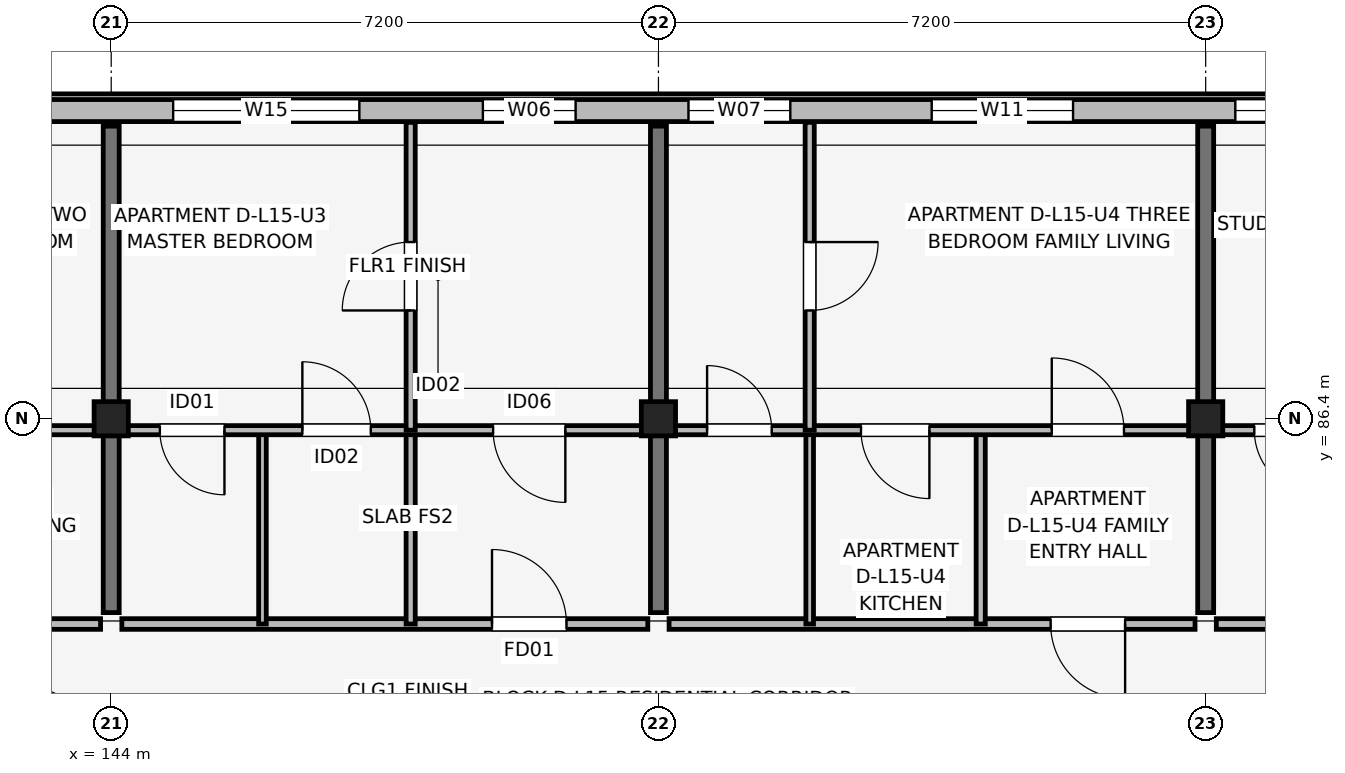
"""IFC4 building model, lengths in metres.
Left out: names, types, materials, properties, quantities, classifications, styles, units other than length and angle.
Written with IfcOpenShell. Run it as: python <this file> out.ifc"""

import sys

from ifc_helpers import new_model, si_unit, direction, frame, frame_2d, origin, origin_2d, place, context, subcontext, project, spatial, rectangle, extrude, element, fill, save


model = new_model("IFC4")
c1 = context("Model", 3, precision=1e-05, world=origin(), true_north=direction((0.0, 1.0)))
c2 = subcontext(c1, "Body", "Model", "MODEL_VIEW")
j1 = project(units=[si_unit("LENGTHUNIT", "METRE"), si_unit("PLANEANGLEUNIT", "RADIAN")], contexts=[c1])
p1 = place(None, origin())
s1 = spatial("IfcSite", under=j1, at=p1, CompositionType="ELEMENT")
p2 = place(p1, origin())
s2 = spatial("IfcBuilding", under=s1, at=p2, CompositionType="ELEMENT")
p3 = place(p2, frame((0.0, 0.0, 49.65)))
s3 = spatial("IfcBuildingStorey", under=s2, at=p3, CompositionType="ELEMENT", Elevation=49.65)
for number, where, z_axis, x_axis in (
    (1, (144.0, 86.4, 0.0), (0.0, 0.0, 1.0), (1.0, 0.0, 0.0)),
    (2, (151.2, 86.4, 0.0), (0.0, 0.0, 1.0), (1.0, 0.0, 0.0)),
    (3, (158.4, 86.4, 0.0), (0.0, 0.0, 1.0), (1.0, 0.0, 0.0)),
):
    element("IfcColumn", number, at=place(p3, frame(where, z_axis=z_axis, x_axis=x_axis)), inside=s3, PredefinedType="COLUMN", context=c2, shape_type="SweptSolid", body=[
        extrude(rectangle(XDim=0.45, YDim=0.45, at=origin_2d()), origin(), (0.0, 0.0, 1.0), 3.15),
    ])
for number, where, z_axis, x_axis in (
    (4, (144.0, 83.85, 0.0), (0.0, 0.0, 1.0), (0.0, 1.0, 0.0)),
    (5, (151.2, 83.85, 0.0), (0.0, 0.0, 1.0), (0.0, 1.0, 0.0)),
    (6, (158.4, 83.85, 0.0), (0.0, 0.0, 1.0), (0.0, 1.0, 0.0)),
):
    element("IfcWall", number, at=place(p3, frame(where, z_axis=z_axis, x_axis=x_axis)), inside=s3, PredefinedType="SHEAR", context=c2, shape_type="SweptSolid", body=[
        extrude(rectangle(XDim=6.4, YDim=0.21, at=frame_2d((3.2, 0.0))), origin(), (0.0, 0.0, 1.0), 3.15),
    ])
p4 = place(p3, frame((161.2, 90.455, 0.0), z_axis=(0.0, 0.0, 1.0), x_axis=(-1.0, 0.0, 0.0)))
e7 = element("IfcWall", 7, at=p4, inside=s3, PredefinedType="SOLIDWALL", context=c2, shape_type="SweptSolid", body=[
    extrude(rectangle(XDim=26.6, YDim=0.29, at=frame_2d((13.3, 0.0))), origin(), (0.0, 0.0, 1.0), 2.48),
])
p5 = place(p4, frame((22.91, 0.0, 0.75)))
e8 = element("IfcOpeningElement", 8, at=p5, cuts=e7, PredefinedType="OPENING", context=c2, shape_type="SweptSolid", body=[
    extrude(rectangle(XDim=0.85, YDim=1.4, at=frame_2d((0.425, 0.7))), frame((0.0, 0.155, 0.0), z_axis=(0.0, -1.0, 0.0), x_axis=(1.0, 0.0, 0.0)), (0.0, 0.0, 1.0), 0.31),
])
p6 = place(p4, frame((18.725, 0.0, 0.7)))
e9 = element("IfcOpeningElement", 9, at=p6, cuts=e7, PredefinedType="OPENING", context=c2, shape_type="SweptSolid", body=[
    extrude(rectangle(XDim=2.3, YDim=1.65, at=frame_2d((1.15, 0.825))), frame((0.0, 0.155, 0.0), z_axis=(0.0, -1.0, 0.0), x_axis=(1.0, 0.0, 0.0)), (0.0, 0.0, 1.0), 0.31),
])
p7 = place(p4, frame((13.935, 0.0, 0.7)))
e10 = element("IfcOpeningElement", 10, at=p7, cuts=e7, PredefinedType="OPENING", context=c2, shape_type="SweptSolid", body=[
    extrude(rectangle(XDim=2.45, YDim=1.65, at=frame_2d((1.225, 0.825))), frame((0.0, 0.155, 0.0), z_axis=(0.0, -1.0, 0.0), x_axis=(1.0, 0.0, 0.0)), (0.0, 0.0, 1.0), 0.31),
])
p8 = place(p4, frame((11.09, 0.0, 0.75)))
e11 = element("IfcOpeningElement", 11, at=p8, cuts=e7, PredefinedType="OPENING", context=c2, shape_type="SweptSolid", body=[
    extrude(rectangle(XDim=1.22, YDim=1.5, at=frame_2d((0.61, 0.75))), frame((0.0, 0.155, 0.0), z_axis=(0.0, -1.0, 0.0), x_axis=(1.0, 0.0, 0.0)), (0.0, 0.0, 1.0), 0.31),
])
p9 = place(p4, frame((8.265, 0.0, 0.75)))
e12 = element("IfcOpeningElement", 12, at=p9, cuts=e7, PredefinedType="OPENING", context=c2, shape_type="SweptSolid", body=[
    extrude(rectangle(XDim=1.34, YDim=1.55, at=frame_2d((0.67, 0.775))), frame((0.0, 0.155, 0.0), z_axis=(0.0, -1.0, 0.0), x_axis=(1.0, 0.0, 0.0)), (0.0, 0.0, 1.0), 0.31),
])
p10 = place(p4, frame((4.545, 0.0, 0.7)))
e13 = element("IfcOpeningElement", 13, at=p10, cuts=e7, PredefinedType="OPENING", context=c2, shape_type="SweptSolid", body=[
    extrude(rectangle(XDim=1.86, YDim=1.6, at=frame_2d((0.93, 0.8))), frame((0.0, 0.155, 0.0), z_axis=(0.0, -1.0, 0.0), x_axis=(1.0, 0.0, 0.0)), (0.0, 0.0, 1.0), 0.31),
])
p11 = place(p4, frame((0.41, 0.0, 0.7)))
e14 = element("IfcOpeningElement", 14, at=p11, cuts=e7, PredefinedType="OPENING", context=c2, shape_type="SweptSolid", body=[
    extrude(rectangle(XDim=2.0, YDim=1.65, at=frame_2d((1.0, 0.825))), frame((0.0, 0.155, 0.0), z_axis=(0.0, -1.0, 0.0), x_axis=(1.0, 0.0, 0.0)), (0.0, 0.0, 1.0), 0.31),
])
p12 = place(p3, frame((136.94, 83.7, 0.0), z_axis=(0.0, 0.0, 1.0), x_axis=(1.0, 0.0, 0.0)))
e15 = element("IfcWall", 15, at=p12, inside=s3, PredefinedType="PARTITIONING", context=c2, shape_type="SweptSolid", body=[
    extrude(rectangle(XDim=6.92, YDim=0.14, at=frame_2d((3.46, 0.0))), origin(), (0.0, 0.0, 1.0), 2.38),
])
p13 = place(p12, frame((6.0, 0.0, 0.0), z_axis=(0.0, 0.0, 1.0), x_axis=(-1.0, 0.0, 0.0)))
e16 = element("IfcOpeningElement", 16, at=p13, cuts=e15, PredefinedType="OPENING", context=c2, shape_type="SweptSolid", body=[
    extrude(rectangle(XDim=0.98, YDim=2.1, at=frame_2d((0.49, 1.05))), frame((0.0, 0.08, 0.0), z_axis=(0.0, -1.0, 0.0), x_axis=(1.0, 0.0, 0.0)), (0.0, 0.0, 1.0), 0.16),
])
p14 = place(p3, frame((136.94, 86.25, 0.0), z_axis=(0.0, 0.0, 1.0), x_axis=(1.0, 0.0, 0.0)))
e17 = element("IfcWall", 17, at=p14, inside=s3, PredefinedType="PARTITIONING", context=c2, shape_type="SweptSolid", body=[
    extrude(rectangle(XDim=6.92, YDim=0.12, at=frame_2d((3.46, 0.0))), origin(), (0.0, 0.0, 1.0), 2.38),
])
p15 = place(p14, frame((0.5, 0.0, 0.0)))
e18 = element("IfcOpeningElement", 18, at=p15, cuts=e17, PredefinedType="OPENING", context=c2, shape_type="SweptSolid", body=[
    extrude(rectangle(XDim=0.85, YDim=2.08, at=frame_2d((0.425, 1.04))), frame((0.0, 0.07, 0.0), z_axis=(0.0, -1.0, 0.0), x_axis=(1.0, 0.0, 0.0)), (0.0, 0.0, 1.0), 0.14),
])
p16 = place(p14, frame((3.425, 0.0, 0.0), z_axis=(0.0, 0.0, 1.0), x_axis=(-1.0, 0.0, 0.0)))
e19 = element("IfcOpeningElement", 19, at=p16, cuts=e17, PredefinedType="OPENING", context=c2, shape_type="SweptSolid", body=[
    extrude(rectangle(XDim=0.9, YDim=2.08, at=frame_2d((0.45, 1.04))), frame((0.0, 0.07, 0.0), z_axis=(0.0, -1.0, 0.0), x_axis=(1.0, 0.0, 0.0)), (0.0, 0.0, 1.0), 0.14),
])
p17 = place(p14, frame((5.035, 0.0, 0.0)))
e20 = element("IfcOpeningElement", 20, at=p17, cuts=e17, PredefinedType="OPENING", context=c2, shape_type="SweptSolid", body=[
    extrude(rectangle(XDim=0.95, YDim=2.08, at=frame_2d((0.475, 1.04))), frame((0.0, 0.07, 0.0), z_axis=(0.0, -1.0, 0.0), x_axis=(1.0, 0.0, 0.0)), (0.0, 0.0, 1.0), 0.14),
])
p18 = place(p3, frame((144.14, 83.7, 0.0), z_axis=(0.0, 0.0, 1.0), x_axis=(1.0, 0.0, 0.0)))
e21 = element("IfcWall", 21, at=p18, inside=s3, PredefinedType="PARTITIONING", context=c2, shape_type="SweptSolid", body=[
    extrude(rectangle(XDim=6.92, YDim=0.14, at=frame_2d((3.46, 0.0))), origin(), (0.0, 0.0, 1.0), 2.38),
])
p19 = place(p18, frame((4.87, 0.0, 0.0)))
e22 = element("IfcOpeningElement", 22, at=p19, cuts=e21, PredefinedType="OPENING", context=c2, shape_type="SweptSolid", body=[
    extrude(rectangle(XDim=0.98, YDim=2.1, at=frame_2d((0.49, 1.05))), frame((0.0, 0.08, 0.0), z_axis=(0.0, -1.0, 0.0), x_axis=(1.0, 0.0, 0.0)), (0.0, 0.0, 1.0), 0.16),
])
p20 = place(p3, frame((145.99, 83.7, 0.0), z_axis=(0.0, 0.0, 1.0), x_axis=(0.0, 1.0, 0.0)))
e23 = element("IfcWall", 23, at=p20, inside=s3, PredefinedType="PARTITIONING", context=c2, shape_type="SweptSolid", body=[
    extrude(rectangle(XDim=2.55, YDim=0.1, at=frame_2d((1.275, 0.0))), origin(), (0.0, 0.0, 1.0), 2.38),
])
p21 = place(p3, frame((147.94, 83.7, 0.0), z_axis=(0.0, 0.0, 1.0), x_axis=(0.0, 1.0, 0.0)))
e24 = element("IfcWall", 24, at=p21, inside=s3, PredefinedType="PARTITIONING", context=c2, shape_type="SweptSolid", body=[
    extrude(rectangle(XDim=2.55, YDim=0.12, at=frame_2d((1.275, 0.0))), origin(), (0.0, 0.0, 1.0), 2.38),
])
p22 = place(p3, frame((144.14, 86.25, 0.0), z_axis=(0.0, 0.0, 1.0), x_axis=(1.0, 0.0, 0.0)))
e25 = element("IfcWall", 25, at=p22, inside=s3, PredefinedType="PARTITIONING", context=c2, shape_type="SweptSolid", body=[
    extrude(rectangle(XDim=6.92, YDim=0.12, at=frame_2d((3.46, 0.0))), origin(), (0.0, 0.0, 1.0), 2.38),
])
p23 = place(p22, frame((1.35, 0.0, 0.0), z_axis=(0.0, 0.0, 1.0), x_axis=(-1.0, 0.0, 0.0)))
e26 = element("IfcOpeningElement", 26, at=p23, cuts=e25, PredefinedType="OPENING", context=c2, shape_type="SweptSolid", body=[
    extrude(rectangle(XDim=0.85, YDim=2.08, at=frame_2d((0.425, 1.04))), frame((0.0, 0.07, 0.0), z_axis=(0.0, -1.0, 0.0), x_axis=(1.0, 0.0, 0.0)), (0.0, 0.0, 1.0), 0.14),
])
p24 = place(p22, frame((2.375, 0.0, 0.0)))
e27 = element("IfcOpeningElement", 27, at=p24, cuts=e25, PredefinedType="OPENING", context=c2, shape_type="SweptSolid", body=[
    extrude(rectangle(XDim=0.9, YDim=2.08, at=frame_2d((0.45, 1.04))), frame((0.0, 0.07, 0.0), z_axis=(0.0, -1.0, 0.0), x_axis=(1.0, 0.0, 0.0)), (0.0, 0.0, 1.0), 0.14),
])
p25 = place(p22, frame((5.835, 0.0, 0.0), z_axis=(0.0, 0.0, 1.0), x_axis=(-1.0, 0.0, 0.0)))
e28 = element("IfcOpeningElement", 28, at=p25, cuts=e25, PredefinedType="OPENING", context=c2, shape_type="SweptSolid", body=[
    extrude(rectangle(XDim=0.95, YDim=2.08, at=frame_2d((0.475, 1.04))), frame((0.0, 0.07, 0.0), z_axis=(0.0, -1.0, 0.0), x_axis=(1.0, 0.0, 0.0)), (0.0, 0.0, 1.0), 0.14),
])
p26 = place(p3, frame((147.94, 86.25, 0.0), z_axis=(0.0, 0.0, 1.0), x_axis=(0.0, 1.0, 0.0)))
e29 = element("IfcWall", 29, at=p26, inside=s3, PredefinedType="PARTITIONING", context=c2, shape_type="SweptSolid", body=[
    extrude(rectangle(XDim=4.05, YDim=0.12, at=frame_2d((2.025, 0.0))), origin(), (0.0, 0.0, 1.0), 2.38),
])
p27 = place(p26, frame((1.575, 0.0, 0.0)))
e30 = element("IfcOpeningElement", 30, at=p27, cuts=e29, PredefinedType="OPENING", context=c2, shape_type="SweptSolid", body=[
    extrude(rectangle(XDim=0.9, YDim=2.08, at=frame_2d((0.45, 1.04))), frame((0.0, 0.07, 0.0), z_axis=(0.0, -1.0, 0.0), x_axis=(1.0, 0.0, 0.0)), (0.0, 0.0, 1.0), 0.14),
])
p28 = place(p3, frame((151.34, 83.7, 0.0), z_axis=(0.0, 0.0, 1.0), x_axis=(1.0, 0.0, 0.0)))
e31 = element("IfcWall", 31, at=p28, inside=s3, PredefinedType="PARTITIONING", context=c2, shape_type="SweptSolid", body=[
    extrude(rectangle(XDim=6.92, YDim=0.14, at=frame_2d((3.46, 0.0))), origin(), (0.0, 0.0, 1.0), 2.38),
])
p29 = place(p28, frame((6.0, 0.0, 0.0), z_axis=(0.0, 0.0, 1.0), x_axis=(-1.0, 0.0, 0.0)))
e32 = element("IfcOpeningElement", 32, at=p29, cuts=e31, PredefinedType="OPENING", context=c2, shape_type="SweptSolid", body=[
    extrude(rectangle(XDim=0.98, YDim=2.1, at=frame_2d((0.49, 1.05))), frame((0.0, 0.08, 0.0), z_axis=(0.0, -1.0, 0.0), x_axis=(1.0, 0.0, 0.0)), (0.0, 0.0, 1.0), 0.16),
])
p30 = place(p3, frame((153.19, 83.7, 0.0), z_axis=(0.0, 0.0, 1.0), x_axis=(0.0, 1.0, 0.0)))
e33 = element("IfcWall", 33, at=p30, inside=s3, PredefinedType="PARTITIONING", context=c2, shape_type="SweptSolid", body=[
    extrude(rectangle(XDim=2.55, YDim=0.1, at=frame_2d((1.275, 0.0))), origin(), (0.0, 0.0, 1.0), 2.38),
])
p31 = place(p3, frame((155.44, 83.7, 0.0), z_axis=(0.0, 0.0, 1.0), x_axis=(0.0, 1.0, 0.0)))
e34 = element("IfcWall", 34, at=p31, inside=s3, PredefinedType="PARTITIONING", context=c2, shape_type="SweptSolid", body=[
    extrude(rectangle(XDim=2.55, YDim=0.12, at=frame_2d((1.275, 0.0))), origin(), (0.0, 0.0, 1.0), 2.38),
])
p32 = place(p3, frame((151.34, 86.25, 0.0), z_axis=(0.0, 0.0, 1.0), x_axis=(1.0, 0.0, 0.0)))
e35 = element("IfcWall", 35, at=p32, inside=s3, PredefinedType="PARTITIONING", context=c2, shape_type="SweptSolid", body=[
    extrude(rectangle(XDim=6.92, YDim=0.12, at=frame_2d((3.46, 0.0))), origin(), (0.0, 0.0, 1.0), 2.38),
])
p33 = place(p32, frame((0.5, 0.0, 0.0)))
e36 = element("IfcOpeningElement", 36, at=p33, cuts=e35, PredefinedType="OPENING", context=c2, shape_type="SweptSolid", body=[
    extrude(rectangle(XDim=0.85, YDim=2.08, at=frame_2d((0.425, 1.04))), frame((0.0, 0.07, 0.0), z_axis=(0.0, -1.0, 0.0), x_axis=(1.0, 0.0, 0.0)), (0.0, 0.0, 1.0), 0.14),
])
p34 = place(p32, frame((3.425, 0.0, 0.0), z_axis=(0.0, 0.0, 1.0), x_axis=(-1.0, 0.0, 0.0)))
e37 = element("IfcOpeningElement", 37, at=p34, cuts=e35, PredefinedType="OPENING", context=c2, shape_type="SweptSolid", body=[
    extrude(rectangle(XDim=0.9, YDim=2.08, at=frame_2d((0.45, 1.04))), frame((0.0, 0.07, 0.0), z_axis=(0.0, -1.0, 0.0), x_axis=(1.0, 0.0, 0.0)), (0.0, 0.0, 1.0), 0.14),
])
p35 = place(p32, frame((5.035, 0.0, 0.0)))
e38 = element("IfcOpeningElement", 38, at=p35, cuts=e35, PredefinedType="OPENING", context=c2, shape_type="SweptSolid", body=[
    extrude(rectangle(XDim=0.95, YDim=2.08, at=frame_2d((0.475, 1.04))), frame((0.0, 0.07, 0.0), z_axis=(0.0, -1.0, 0.0), x_axis=(1.0, 0.0, 0.0)), (0.0, 0.0, 1.0), 0.14),
])
p36 = place(p3, frame((153.19, 86.25, 0.0), z_axis=(0.0, 0.0, 1.0), x_axis=(0.0, 1.0, 0.0)))
e39 = element("IfcWall", 39, at=p36, inside=s3, PredefinedType="PARTITIONING", context=c2, shape_type="SweptSolid", body=[
    extrude(rectangle(XDim=4.05, YDim=0.12, at=frame_2d((2.025, 0.0))), origin(), (0.0, 0.0, 1.0), 2.38),
])
p37 = place(p36, frame((2.475, 0.0, 0.0), z_axis=(0.0, 0.0, 1.0), x_axis=(-1.0, 0.0, 0.0)))
e40 = element("IfcOpeningElement", 40, at=p37, cuts=e39, PredefinedType="OPENING", context=c2, shape_type="SweptSolid", body=[
    extrude(rectangle(XDim=0.9, YDim=2.08, at=frame_2d((0.45, 1.04))), frame((0.0, 0.07, 0.0), z_axis=(0.0, -1.0, 0.0), x_axis=(1.0, 0.0, 0.0)), (0.0, 0.0, 1.0), 0.14),
])
p38 = place(p3, frame((158.54, 83.7, 0.0), z_axis=(0.0, 0.0, 1.0), x_axis=(1.0, 0.0, 0.0)))
e41 = element("IfcWall", 41, at=p38, inside=s3, PredefinedType="PARTITIONING", context=c2, shape_type="SweptSolid", body=[
    extrude(rectangle(XDim=4.52, YDim=0.14, at=frame_2d((2.26, 0.0))), origin(), (0.0, 0.0, 1.0), 2.38),
])
p39 = place(p38, frame((2.54, 0.0, 0.0)))
e42 = element("IfcOpeningElement", 42, at=p39, cuts=e41, PredefinedType="OPENING", context=c2, shape_type="SweptSolid", body=[
    extrude(rectangle(XDim=0.98, YDim=2.1, at=frame_2d((0.49, 1.05))), frame((0.0, 0.08, 0.0), z_axis=(0.0, -1.0, 0.0), x_axis=(1.0, 0.0, 0.0)), (0.0, 0.0, 1.0), 0.16),
])
p40 = place(p3, frame((158.54, 86.25, 0.0), z_axis=(0.0, 0.0, 1.0), x_axis=(1.0, 0.0, 0.0)))
e43 = element("IfcWall", 43, at=p40, inside=s3, PredefinedType="PARTITIONING", context=c2, shape_type="SweptSolid", body=[
    extrude(rectangle(XDim=4.52, YDim=0.12, at=frame_2d((2.26, 0.0))), origin(), (0.0, 0.0, 1.0), 2.38),
])
p41 = place(p40, frame((1.35, 0.0, 0.0), z_axis=(0.0, 0.0, 1.0), x_axis=(-1.0, 0.0, 0.0)))
e44 = element("IfcOpeningElement", 44, at=p41, cuts=e43, PredefinedType="OPENING", context=c2, shape_type="SweptSolid", body=[
    extrude(rectangle(XDim=0.85, YDim=2.08, at=frame_2d((0.425, 1.04))), frame((0.0, 0.07, 0.0), z_axis=(0.0, -1.0, 0.0), x_axis=(1.0, 0.0, 0.0)), (0.0, 0.0, 1.0), 0.14),
])
p42 = place(p40, frame((2.58, 0.0, 0.0)))
e45 = element("IfcOpeningElement", 45, at=p42, cuts=e43, PredefinedType="OPENING", context=c2, shape_type="SweptSolid", body=[
    extrude(rectangle(XDim=0.9, YDim=2.08, at=frame_2d((0.45, 1.04))), frame((0.0, 0.07, 0.0), z_axis=(0.0, -1.0, 0.0), x_axis=(1.0, 0.0, 0.0)), (0.0, 0.0, 1.0), 0.14),
])
p43 = place(p7, origin())
e46 = element("IfcWindow", 46, at=p43, inside=s3, PartitioningType="SINGLE_PANEL", PredefinedType="WINDOW", context=c2, shape_type="SweptSolid", body=[
    extrude(rectangle(XDim=2.45, YDim=1.65, at=frame_2d((1.225, 0.825))), frame((0.0, 0.03, 0.0), z_axis=(0.0, -1.0, 0.0), x_axis=(1.0, 0.0, 0.0)), (0.0, 0.0, 1.0), 0.06),
])
fill(e10, e46)
p44 = place(p8, origin())
e47 = element("IfcWindow", 47, at=p44, inside=s3, PartitioningType="SINGLE_PANEL", PredefinedType="WINDOW", context=c2, shape_type="SweptSolid", body=[
    extrude(rectangle(XDim=1.22, YDim=1.5, at=frame_2d((0.61, 0.75))), frame((0.0, 0.03, 0.0), z_axis=(0.0, -1.0, 0.0), x_axis=(1.0, 0.0, 0.0)), (0.0, 0.0, 1.0), 0.06),
])
fill(e11, e47)
p45 = place(p9, origin())
e48 = element("IfcWindow", 48, at=p45, inside=s3, PartitioningType="SINGLE_PANEL", PredefinedType="WINDOW", context=c2, shape_type="SweptSolid", body=[
    extrude(rectangle(XDim=1.34, YDim=1.55, at=frame_2d((0.67, 0.775))), frame((0.0, 0.03, 0.0), z_axis=(0.0, -1.0, 0.0), x_axis=(1.0, 0.0, 0.0)), (0.0, 0.0, 1.0), 0.06),
])
fill(e12, e48)
p46 = place(p10, origin())
e49 = element("IfcWindow", 49, at=p46, inside=s3, PartitioningType="SINGLE_PANEL", PredefinedType="WINDOW", context=c2, shape_type="SweptSolid", body=[
    extrude(rectangle(XDim=1.86, YDim=1.6, at=frame_2d((0.93, 0.8))), frame((0.0, 0.03, 0.0), z_axis=(0.0, -1.0, 0.0), x_axis=(1.0, 0.0, 0.0)), (0.0, 0.0, 1.0), 0.06),
])
fill(e13, e49)
p47 = place(p11, origin())
e50 = element("IfcWindow", 50, at=p47, inside=s3, PartitioningType="SINGLE_PANEL", PredefinedType="WINDOW", context=c2, shape_type="SweptSolid", body=[
    extrude(rectangle(XDim=2.0, YDim=1.65, at=frame_2d((1.0, 0.825))), frame((0.0, 0.03, 0.0), z_axis=(0.0, -1.0, 0.0), x_axis=(1.0, 0.0, 0.0)), (0.0, 0.0, 1.0), 0.06),
])
fill(e14, e50)
p48 = place(p19, origin())
e51 = element("IfcDoor", 51, at=p48, inside=s3, OperationType="SINGLE_SWING_LEFT", PredefinedType="DOOR", context=c2, shape_type="SweptSolid", body=[
    extrude(rectangle(XDim=0.98, YDim=2.1, at=frame_2d((0.49, 1.05))), frame((0.0, 0.025, 0.0), z_axis=(0.0, -1.0, 0.0), x_axis=(1.0, 0.0, 0.0)), (0.0, 0.0, 1.0), 0.05),
])
fill(e22, e51)
p49 = place(p23, origin())
e52 = element("IfcDoor", 52, at=p49, inside=s3, OperationType="SINGLE_SWING_RIGHT", PredefinedType="DOOR", context=c2, shape_type="SweptSolid", body=[
    extrude(rectangle(XDim=0.85, YDim=2.08, at=frame_2d((0.425, 1.04))), frame((0.0, 0.025, 0.0), z_axis=(0.0, -1.0, 0.0), x_axis=(1.0, 0.0, 0.0)), (0.0, 0.0, 1.0), 0.05),
])
fill(e26, e52)
p50 = place(p24, origin())
e53 = element("IfcDoor", 53, at=p50, inside=s3, OperationType="SINGLE_SWING_LEFT", PredefinedType="DOOR", context=c2, shape_type="SweptSolid", body=[
    extrude(rectangle(XDim=0.9, YDim=2.08, at=frame_2d((0.45, 1.04))), frame((0.0, 0.025, 0.0), z_axis=(0.0, -1.0, 0.0), x_axis=(1.0, 0.0, 0.0)), (0.0, 0.0, 1.0), 0.05),
])
fill(e27, e53)
p51 = place(p25, origin())
e54 = element("IfcDoor", 54, at=p51, inside=s3, OperationType="SINGLE_SWING_RIGHT", PredefinedType="DOOR", context=c2, shape_type="SweptSolid", body=[
    extrude(rectangle(XDim=0.95, YDim=2.08, at=frame_2d((0.475, 1.04))), frame((0.0, 0.025, 0.0), z_axis=(0.0, -1.0, 0.0), x_axis=(1.0, 0.0, 0.0)), (0.0, 0.0, 1.0), 0.05),
])
fill(e28, e54)
p52 = place(p27, origin())
e55 = element("IfcDoor", 55, at=p52, inside=s3, OperationType="SINGLE_SWING_LEFT", PredefinedType="DOOR", context=c2, shape_type="SweptSolid", body=[
    extrude(rectangle(XDim=0.9, YDim=2.08, at=frame_2d((0.45, 1.04))), frame((0.0, 0.025, 0.0), z_axis=(0.0, -1.0, 0.0), x_axis=(1.0, 0.0, 0.0)), (0.0, 0.0, 1.0), 0.05),
])
fill(e30, e55)
p53 = place(p29, origin())
e56 = element("IfcDoor", 56, at=p53, inside=s3, OperationType="SINGLE_SWING_RIGHT", PredefinedType="DOOR", context=c2, shape_type="SweptSolid", body=[
    extrude(rectangle(XDim=0.98, YDim=2.1, at=frame_2d((0.49, 1.05))), frame((0.0, 0.025, 0.0), z_axis=(0.0, -1.0, 0.0), x_axis=(1.0, 0.0, 0.0)), (0.0, 0.0, 1.0), 0.05),
])
fill(e32, e56)
p54 = place(p33, origin())
e57 = element("IfcDoor", 57, at=p54, inside=s3, OperationType="SINGLE_SWING_LEFT", PredefinedType="DOOR", context=c2, shape_type="SweptSolid", body=[
    extrude(rectangle(XDim=0.85, YDim=2.08, at=frame_2d((0.425, 1.04))), frame((0.0, 0.025, 0.0), z_axis=(0.0, -1.0, 0.0), x_axis=(1.0, 0.0, 0.0)), (0.0, 0.0, 1.0), 0.05),
])
fill(e36, e57)
p55 = place(p34, origin())
e58 = element("IfcDoor", 58, at=p55, inside=s3, OperationType="SINGLE_SWING_RIGHT", PredefinedType="DOOR", context=c2, shape_type="SweptSolid", body=[
    extrude(rectangle(XDim=0.9, YDim=2.08, at=frame_2d((0.45, 1.04))), frame((0.0, 0.025, 0.0), z_axis=(0.0, -1.0, 0.0), x_axis=(1.0, 0.0, 0.0)), (0.0, 0.0, 1.0), 0.05),
])
fill(e37, e58)
p56 = place(p35, origin())
e59 = element("IfcDoor", 59, at=p56, inside=s3, OperationType="SINGLE_SWING_LEFT", PredefinedType="DOOR", context=c2, shape_type="SweptSolid", body=[
    extrude(rectangle(XDim=0.95, YDim=2.08, at=frame_2d((0.475, 1.04))), frame((0.0, 0.025, 0.0), z_axis=(0.0, -1.0, 0.0), x_axis=(1.0, 0.0, 0.0)), (0.0, 0.0, 1.0), 0.05),
])
fill(e38, e59)
p57 = place(p37, origin())
e60 = element("IfcDoor", 60, at=p57, inside=s3, OperationType="SINGLE_SWING_RIGHT", PredefinedType="DOOR", context=c2, shape_type="SweptSolid", body=[
    extrude(rectangle(XDim=0.9, YDim=2.08, at=frame_2d((0.45, 1.04))), frame((0.0, 0.025, 0.0), z_axis=(0.0, -1.0, 0.0), x_axis=(1.0, 0.0, 0.0)), (0.0, 0.0, 1.0), 0.05),
])
fill(e40, e60)
p58 = place(p41, origin())
e61 = element("IfcDoor", 61, at=p58, inside=s3, OperationType="SINGLE_SWING_RIGHT", PredefinedType="DOOR", context=c2, shape_type="SweptSolid", body=[
    extrude(rectangle(XDim=0.85, YDim=2.08, at=frame_2d((0.425, 1.04))), frame((0.0, 0.025, 0.0), z_axis=(0.0, -1.0, 0.0), x_axis=(1.0, 0.0, 0.0)), (0.0, 0.0, 1.0), 0.05),
])
fill(e44, e61)
save(model, sys.argv[1])
